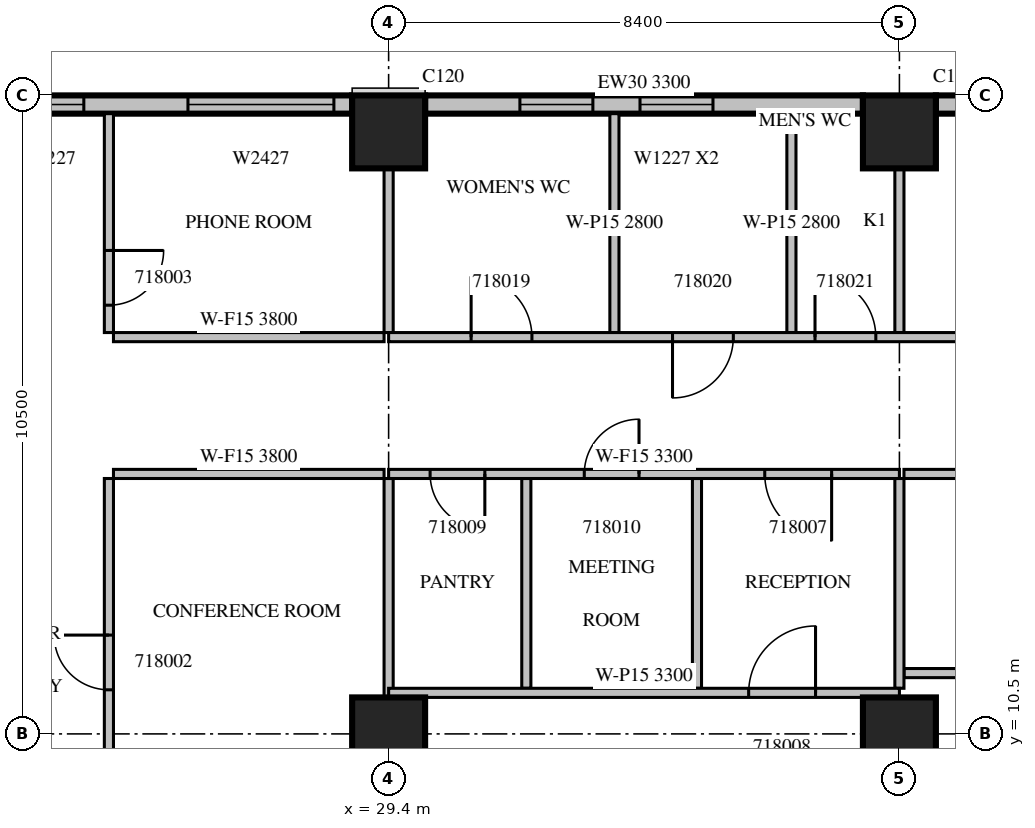
"""IFC4 building model, lengths in metres.
Left out: names, types, materials, properties, quantities, classifications, styles, units other than length and angle.
Written with IfcOpenShell. Run it as: python <this file> out.ifc"""

import sys

from ifc_helpers import new_model, si_unit, direction, frame, frame_2d, origin, origin_2d, place, context, subcontext, project, spatial, rectangle, extrude, source, transform, mapped, element, fill, save


model = new_model("IFC4")
c1 = context("Model", 3, precision=1e-05, world=origin(), true_north=direction((0.0, 1.0)))
c2 = subcontext(c1, "Body", "Model", "MODEL_VIEW")
j1 = project(units=[si_unit("LENGTHUNIT", "METRE"), si_unit("PLANEANGLEUNIT", "RADIAN")], contexts=[c1])
p1 = place(None, origin())
s1 = spatial("IfcSite", under=j1, at=p1, CompositionType="ELEMENT")
p2 = place(p1, origin())
s2 = spatial("IfcBuilding", under=s1, at=p2, CompositionType="ELEMENT")
p3 = place(p2, frame((0.0, 0.0, 86.7)))
s3 = spatial("IfcBuildingStorey", under=s2, at=p3, CompositionType="ELEMENT", Elevation=86.7)
m1 = source(origin(), c2, "Body", "SweptSolid", [
    extrude(rectangle(XDim=1.2, YDim=1.2, at=origin_2d()), origin(), (0.0, 0.0, 1.0), 4.2),
])
for number, where, z_axis, x_axis in (
    (1, (29.4, 10.5, 0.0), (0.0, 0.0, 1.0), (1.0, 0.0, 0.0)),
    (2, (37.8, 10.5, 0.0), (0.0, 0.0, 1.0), (1.0, 0.0, 0.0)),
    (3, (29.4, 20.4, 0.0), (0.0, 0.0, 1.0), (1.0, 0.0, 0.0)),
    (4, (37.8, 20.4, 0.0), (0.0, 0.0, 1.0), (1.0, 0.0, 0.0)),
):
    element("IfcColumn", number, at=place(p3, frame(where, z_axis=z_axis, x_axis=x_axis)), inside=s3, PredefinedType="COLUMN", context=c2, shape_type="MappedRepresentation", body=[
        mapped(m1, transform((0.0, 0.0, 0.0), scale=1.0)),
    ])
m2 = source(origin(), c2, "Body", "SweptSolid", [
    extrude(rectangle(XDim=7.2, YDim=0.3, at=frame_2d((3.6, 0.0))), origin(), (0.0, 0.0, 1.0), 3.8),
])
p4 = place(p3, frame((45.6, 20.85, 0.0), z_axis=(0.0, 0.0, 1.0), x_axis=(-1.0, 0.0, 0.0)))
e5 = element("IfcWall", 5, at=p4, inside=s3, PredefinedType="STANDARD", context=c2, shape_type="MappedRepresentation", body=[
    mapped(m2, transform((0.0, 0.0, 0.0), scale=1.0)),
])
m3 = source(origin(), c2, "Body", "SweptSolid", [
    extrude(rectangle(XDim=2.4, YDim=2.7, at=frame_2d((1.2, 1.35))), frame((0.0, 0.16, 0.0), z_axis=(0.0, -1.0, 0.0), x_axis=(1.0, 0.0, 0.0)), (0.0, 0.0, 1.0), 0.32),
])
p5 = place(p4, frame((0.3, 0.0, 0.6)))
e6 = element("IfcOpeningElement", 6, at=p5, cuts=e5, PredefinedType="OPENING", context=c2, shape_type="MappedRepresentation", body=[
    mapped(m3, transform((0.0, 0.0, 0.0), scale=1.0)),
])
p6 = place(p4, frame((3.75, 0.0, 0.6)))
e7 = element("IfcOpeningElement", 7, at=p6, cuts=e5, PredefinedType="OPENING", context=c2, shape_type="MappedRepresentation", body=[
    mapped(m3, transform((0.0, 0.0, 0.0), scale=1.0)),
])
m4 = source(origin(), c2, "Body", "SweptSolid", [
    extrude(rectangle(XDim=7.2, YDim=0.3, at=frame_2d((3.6, 0.0))), origin(), (0.0, 0.0, 1.0), 3.3),
])
p7 = place(p3, frame((37.2, 20.85, 0.0), z_axis=(0.0, 0.0, 1.0), x_axis=(-1.0, 0.0, 0.0)))
e8 = element("IfcWall", 8, at=p7, inside=s3, PredefinedType="STANDARD", context=c2, shape_type="MappedRepresentation", body=[
    mapped(m4, transform((0.0, 0.0, 0.0), scale=1.0)),
])
m5 = source(origin(), c2, "Body", "SweptSolid", [
    extrude(rectangle(XDim=1.2, YDim=2.7, at=frame_2d((0.6, 1.35))), frame((0.0, 0.16, 0.0), z_axis=(0.0, -1.0, 0.0), x_axis=(1.0, 0.0, 0.0)), (0.0, 0.0, 1.0), 0.32),
])
p8 = place(p7, frame((2.466, 0.0, 0.6)))
e9 = element("IfcOpeningElement", 9, at=p8, cuts=e8, PredefinedType="OPENING", context=c2, shape_type="MappedRepresentation", body=[
    mapped(m5, transform((0.0, 0.0, 0.0), scale=1.0)),
])
p9 = place(p7, frame((4.441, 0.0, 0.6)))
e10 = element("IfcOpeningElement", 10, at=p9, cuts=e8, PredefinedType="OPENING", context=c2, shape_type="MappedRepresentation", body=[
    mapped(m5, transform((0.0, 0.0, 0.0), scale=1.0)),
])
m6 = source(origin(), c2, "Body", "SweptSolid", [
    extrude(rectangle(XDim=6.6, YDim=0.3, at=frame_2d((3.3, 0.0))), origin(), (0.0, 0.0, 1.0), 3.8),
])
p10 = place(p3, frame((28.8, 20.85, 0.0), z_axis=(0.0, 0.0, 1.0), x_axis=(-1.0, 0.0, 0.0)))
e11 = element("IfcWall", 11, at=p10, inside=s3, PredefinedType="STANDARD", context=c2, shape_type="MappedRepresentation", body=[
    mapped(m6, transform((0.0, 0.0, 0.0), scale=1.0)),
])
p11 = place(p10, frame((0.3, 0.0, 0.6)))
e12 = element("IfcOpeningElement", 12, at=p11, cuts=e11, PredefinedType="OPENING", context=c2, shape_type="MappedRepresentation", body=[
    mapped(m3, transform((0.0, 0.0, 0.0), scale=1.0)),
])
p12 = place(p10, frame((4.412, 0.0, 0.6)))
e13 = element("IfcOpeningElement", 13, at=p12, cuts=e11, PredefinedType="OPENING", context=c2, shape_type="MappedRepresentation", body=[
    mapped(m5, transform((0.0, 0.0, 0.0), scale=1.0)),
])
m7 = source(origin(), c2, "Body", "SweptSolid", [
    extrude(rectangle(XDim=11.625, YDim=0.15, at=frame_2d((5.812, 0.0))), origin(), (0.0, 0.0, 1.0), 3.8),
])
p13 = place(p3, frame((24.8, 14.7, 0.0), z_axis=(0.0, 0.0, 1.0), x_axis=(0.0, -1.0, 0.0)))
e14 = element("IfcWall", 14, at=p13, inside=s3, PredefinedType="PARTITIONING", context=c2, shape_type="MappedRepresentation", body=[
    mapped(m7, transform((0.0, 0.0, 0.0), scale=1.0)),
])
m8 = source(origin(), c2, "Body", "SweptSolid", [
    extrude(rectangle(XDim=0.9, YDim=2.1, at=frame_2d((0.45, 1.05))), frame((0.0, 0.085, 0.0), z_axis=(0.0, -1.0, 0.0), x_axis=(1.0, 0.0, 0.0)), (0.0, 0.0, 1.0), 0.17),
])
p14 = place(p13, frame((9.262, 0.0, 0.0)))
e15 = element("IfcOpeningElement", 15, at=p14, cuts=e14, PredefinedType="OPENING", context=c2, shape_type="MappedRepresentation", body=[
    mapped(m8, transform((0.0, 0.0, 0.0), scale=1.0)),
])
p15 = place(p13, frame((2.575, 0.0, 0.0)))
e16 = element("IfcOpeningElement", 16, at=p15, cuts=e14, PredefinedType="OPENING", context=c2, shape_type="MappedRepresentation", body=[
    mapped(m8, transform((0.0, 0.0, 0.0), scale=1.0)),
])
m9 = source(origin(), c2, "Body", "SweptSolid", [
    extrude(rectangle(XDim=3.6, YDim=0.15, at=frame_2d((1.8, 0.0))), origin(), (0.0, 0.0, 1.0), 3.8),
])
p16 = place(p3, frame((24.8, 20.7, 0.0), z_axis=(0.0, 0.0, 1.0), x_axis=(0.0, -1.0, 0.0)))
e17 = element("IfcWall", 17, at=p16, inside=s3, PredefinedType="PARTITIONING", context=c2, shape_type="MappedRepresentation", body=[
    mapped(m9, transform((0.0, 0.0, 0.0), scale=1.0)),
])
p17 = place(p16, frame((2.25, 0.0, 0.0)))
e18 = element("IfcOpeningElement", 18, at=p17, cuts=e17, PredefinedType="OPENING", context=c2, shape_type="MappedRepresentation", body=[
    mapped(m8, transform((0.0, 0.0, 0.0), scale=1.0)),
])
m10 = source(origin(), c2, "Body", "SweptSolid", [
    extrude(rectangle(XDim=4.45, YDim=0.15, at=frame_2d((2.225, 0.0))), origin(), (0.0, 0.0, 1.0), 3.8),
])
for number, where, z_axis, x_axis in (
    (19, (29.325, 14.775, 0.0), (0.0, 0.0, 1.0), (-1.0, 0.0, 0.0)),
    (20, (24.875, 17.025, 0.0), (0.0, 0.0, 1.0), (1.0, 0.0, 0.0)),
):
    element("IfcWall", number, at=place(p3, frame(where, z_axis=z_axis, x_axis=x_axis)), inside=s3, PredefinedType="PARTITIONING", context=c2, shape_type="MappedRepresentation", body=[
        mapped(m10, transform((0.0, 0.0, 0.0), scale=1.0)),
    ])
m11 = source(origin(), c2, "Body", "SweptSolid", [
    extrude(rectangle(XDim=3.601, YDim=0.15, at=frame_2d((1.8, 0.0))), origin(), (0.0, 0.0, 1.0), 3.8),
])
p18 = place(p3, frame((29.4, 11.099, 0.0), z_axis=(0.0, 0.0, 1.0), x_axis=(0.0, 1.0, 0.0)))
e21 = element("IfcWall", 21, at=p18, inside=s3, PredefinedType="PARTITIONING", context=c2, shape_type="MappedRepresentation", body=[
    mapped(m11, transform((0.0, 0.0, 0.0), scale=1.0)),
])
m12 = source(origin(), c2, "Body", "SweptSolid", [
    extrude(rectangle(XDim=2.701, YDim=0.15, at=frame_2d((1.351, 0.0))), origin(), (0.0, 0.0, 1.0), 3.8),
])
p19 = place(p3, frame((29.4, 17.1, 0.0), z_axis=(0.0, 0.0, 1.0), x_axis=(0.0, 1.0, 0.0)))
e22 = element("IfcWall", 22, at=p19, inside=s3, PredefinedType="PARTITIONING", context=c2, shape_type="MappedRepresentation", body=[
    mapped(m12, transform((0.0, 0.0, 0.0), scale=1.0)),
])
m13 = source(origin(), c2, "Body", "SweptSolid", [
    extrude(rectangle(XDim=6.45, YDim=0.15, at=frame_2d((3.225, 0.0))), origin(), (0.0, 0.0, 1.0), 3.8),
])
p20 = place(p3, frame((37.875, 11.5, 0.0), z_axis=(0.0, 0.0, 1.0), x_axis=(1.0, 0.0, 0.0)))
e23 = element("IfcWall", 23, at=p20, inside=s3, PredefinedType="PARTITIONING", context=c2, shape_type="MappedRepresentation", body=[
    mapped(m13, transform((0.0, 0.0, 0.0), scale=1.0)),
])
p21 = place(p3, frame((44.325, 14.775, 0.0), z_axis=(0.0, 0.0, 1.0), x_axis=(-1.0, 0.0, 0.0)))
e24 = element("IfcWall", 24, at=p21, inside=s3, PredefinedType="PARTITIONING", context=c2, shape_type="MappedRepresentation", body=[
    mapped(m13, transform((0.0, 0.0, 0.0), scale=1.0)),
])
p22 = place(p21, frame((2.812, 0.0, 0.0)))
e25 = element("IfcOpeningElement", 25, at=p22, cuts=e24, PredefinedType="OPENING", context=c2, shape_type="MappedRepresentation", body=[
    mapped(m8, transform((0.0, 0.0, 0.0), scale=1.0)),
])
m14 = source(origin(), c2, "Body", "SweptSolid", [
    extrude(rectangle(XDim=3.45, YDim=0.15, at=frame_2d((1.725, 0.0))), origin(), (0.0, 0.0, 1.0), 3.8),
])
for number, where, z_axis, x_axis in (
    (26, (31.665, 11.25, 0.0), (0.0, 0.0, 1.0), (0.0, 1.0, 0.0)),
    (27, (34.471, 11.25, 0.0), (0.0, 0.0, 1.0), (0.0, 1.0, 0.0)),
    (28, (37.8, 11.25, 0.0), (0.0, 0.0, 1.0), (0.0, 1.0, 0.0)),
):
    element("IfcWall", number, at=place(p3, frame(where, z_axis=z_axis, x_axis=x_axis)), inside=s3, PredefinedType="PARTITIONING", context=c2, shape_type="MappedRepresentation", body=[
        mapped(m14, transform((0.0, 0.0, 0.0), scale=1.0)),
    ])
m15 = source(origin(), c2, "Body", "SweptSolid", [
    extrude(rectangle(XDim=8.4, YDim=0.15, at=frame_2d((4.2, 0.0))), origin(), (0.0, 0.0, 1.0), 3.3),
])
p23 = place(p3, frame((37.8, 11.175, 0.0), z_axis=(0.0, 0.0, 1.0), x_axis=(-1.0, 0.0, 0.0)))
e29 = element("IfcWall", 29, at=p23, inside=s3, PredefinedType="PARTITIONING", context=c2, shape_type="MappedRepresentation", body=[
    mapped(m15, transform((0.0, 0.0, 0.0), scale=1.0)),
])
m16 = source(origin(), c2, "Body", "SweptSolid", [
    extrude(rectangle(XDim=1.1, YDim=2.1, at=frame_2d((0.55, 1.05))), frame((0.0, 0.085, 0.0), z_axis=(0.0, -1.0, 0.0), x_axis=(1.0, 0.0, 0.0)), (0.0, 0.0, 1.0), 0.17),
])
p24 = place(p23, frame((1.379, 0.0, 0.0)))
e30 = element("IfcOpeningElement", 30, at=p24, cuts=e29, PredefinedType="OPENING", context=c2, shape_type="MappedRepresentation", body=[
    mapped(m16, transform((0.0, 0.0, 0.0), scale=1.0)),
])
m17 = source(origin(), c2, "Body", "SweptSolid", [
    extrude(rectangle(XDim=3.6, YDim=0.15, at=frame_2d((1.8, 0.0))), origin(), (0.0, 0.0, 1.0), 2.8),
])
for number, where, z_axis, x_axis in (
    (31, (33.113, 20.7, 0.0), (0.0, 0.0, 1.0), (0.0, -1.0, 0.0)),
    (32, (36.024, 20.7, 0.0), (0.0, 0.0, 1.0), (0.0, -1.0, 0.0)),
):
    element("IfcWall", number, at=place(p3, frame(where, z_axis=z_axis, x_axis=x_axis)), inside=s3, PredefinedType="PARTITIONING", context=c2, shape_type="MappedRepresentation", body=[
        mapped(m17, transform((0.0, 0.0, 0.0), scale=1.0)),
    ])
p25 = place(p3, frame((37.8, 17.1, 0.0), z_axis=(0.0, 0.0, 1.0), x_axis=(0.0, 1.0, 0.0)))
e33 = element("IfcWall", 33, at=p25, inside=s3, PredefinedType="PARTITIONING", context=c2, shape_type="MappedRepresentation", body=[
    mapped(m12, transform((0.0, 0.0, 0.0), scale=1.0)),
])
p26 = place(p3, frame((37.8, 14.775, 0.0), z_axis=(0.0, 0.0, 1.0), x_axis=(-1.0, 0.0, 0.0)))
e34 = element("IfcWall", 34, at=p26, inside=s3, PredefinedType="PARTITIONING", context=c2, shape_type="MappedRepresentation", body=[
    mapped(m15, transform((0.0, 0.0, 0.0), scale=1.0)),
])
p27 = place(p26, frame((1.115, 0.0, 0.0)))
e35 = element("IfcOpeningElement", 35, at=p27, cuts=e34, PredefinedType="OPENING", context=c2, shape_type="MappedRepresentation", body=[
    mapped(m16, transform((0.0, 0.0, 0.0), scale=1.0)),
])
p28 = place(p26, frame((6.818, 0.0, 0.0)))
e36 = element("IfcOpeningElement", 36, at=p28, cuts=e34, PredefinedType="OPENING", context=c2, shape_type="MappedRepresentation", body=[
    mapped(m8, transform((0.0, 0.0, 0.0), scale=1.0)),
])
p29 = place(p26, frame((4.282, 0.0, 0.0)))
e37 = element("IfcOpeningElement", 37, at=p29, cuts=e34, PredefinedType="OPENING", context=c2, shape_type="MappedRepresentation", body=[
    mapped(m8, transform((0.0, 0.0, 0.0), scale=1.0)),
])
m18 = source(origin(), c2, "Body", "SweptSolid", [
    extrude(rectangle(XDim=37.5, YDim=0.15, at=frame_2d((18.75, 0.0))), origin(), (0.0, 0.0, 1.0), 3.3),
])
p30 = place(p3, frame((29.4, 17.025, 0.0), z_axis=(0.0, 0.0, 1.0), x_axis=(1.0, 0.0, 0.0)))
e38 = element("IfcWall", 38, at=p30, inside=s3, PredefinedType="PARTITIONING", context=c2, shape_type="MappedRepresentation", body=[
    mapped(m18, transform((0.0, 0.0, 0.0), scale=1.0)),
])
m19 = source(origin(), c2, "Body", "SweptSolid", [
    extrude(rectangle(XDim=1.0, YDim=2.1, at=frame_2d((0.5, 1.05))), frame((0.0, 0.085, 0.0), z_axis=(0.0, -1.0, 0.0), x_axis=(1.0, 0.0, 0.0)), (0.0, 0.0, 1.0), 0.17),
])
p31 = place(p30, frame((1.357, 0.0, 0.0)))
e39 = element("IfcOpeningElement", 39, at=p31, cuts=e38, PredefinedType="OPENING", context=c2, shape_type="MappedRepresentation", body=[
    mapped(m19, transform((0.0, 0.0, 0.0), scale=1.0)),
])
p32 = place(p30, frame((4.669, 0.0, 0.0)))
e40 = element("IfcOpeningElement", 40, at=p32, cuts=e38, PredefinedType="OPENING", context=c2, shape_type="MappedRepresentation", body=[
    mapped(m19, transform((0.0, 0.0, 0.0), scale=1.0)),
])
p33 = place(p30, frame((7.012, 0.0, 0.0)))
e41 = element("IfcOpeningElement", 41, at=p33, cuts=e38, PredefinedType="OPENING", context=c2, shape_type="MappedRepresentation", body=[
    mapped(m19, transform((0.0, 0.0, 0.0), scale=1.0)),
])
p34 = place(p30, frame((12.1, 0.0, 0.0)))
e42 = element("IfcOpeningElement", 42, at=p34, cuts=e38, PredefinedType="OPENING", context=c2, shape_type="MappedRepresentation", body=[
    mapped(m19, transform((0.0, 0.0, 0.0), scale=1.0)),
])
p35 = place(p30, frame((18.898, 0.0, 0.0)))
e43 = element("IfcOpeningElement", 43, at=p35, cuts=e38, PredefinedType="OPENING", context=c2, shape_type="MappedRepresentation", body=[
    mapped(m19, transform((0.0, 0.0, 0.0), scale=1.0)),
])
p36 = place(p30, frame((23.543, 0.0, 0.0)))
e44 = element("IfcOpeningElement", 44, at=p36, cuts=e38, PredefinedType="OPENING", context=c2, shape_type="MappedRepresentation", body=[
    mapped(m19, transform((0.0, 0.0, 0.0), scale=1.0)),
])
p37 = place(p30, frame((26.826, 0.0, 0.0)))
e45 = element("IfcOpeningElement", 45, at=p37, cuts=e38, PredefinedType="OPENING", context=c2, shape_type="MappedRepresentation", body=[
    mapped(m19, transform((0.0, 0.0, 0.0), scale=1.0)),
])
m20 = source(origin(), c2, "Body", "SweptSolid", [
    extrude(rectangle(XDim=1.2, YDim=2.1, at=frame_2d((0.6, 1.05))), frame((0.0, 0.085, 0.0), z_axis=(0.0, -1.0, 0.0), x_axis=(1.0, 0.0, 0.0)), (0.0, 0.0, 1.0), 0.17),
])
p38 = place(p30, frame((30.214, 0.0, 0.0)))
e46 = element("IfcOpeningElement", 46, at=p38, cuts=e38, PredefinedType="OPENING", context=c2, shape_type="MappedRepresentation", body=[
    mapped(m20, transform((0.0, 0.0, 0.0), scale=1.0)),
])
p39 = place(p30, frame((34.721, 0.0, 0.0)))
e47 = element("IfcOpeningElement", 47, at=p39, cuts=e38, PredefinedType="OPENING", context=c2, shape_type="MappedRepresentation", body=[
    mapped(m20, transform((0.0, 0.0, 0.0), scale=1.0)),
])
m21 = source(origin(), c2, "Body", "SweptSolid", [
    extrude(rectangle(XDim=1.2, YDim=2.7, at=frame_2d((0.6, 1.35))), frame((0.0, 0.03, 0.0), z_axis=(0.0, -1.0, 0.0), x_axis=(1.0, 0.0, 0.0)), (0.0, 0.0, 1.0), 0.06),
])
p40 = place(p8, origin())
e48 = element("IfcWindow", 48, at=p40, inside=s3, PartitioningType="SINGLE_PANEL", PredefinedType="WINDOW", context=c2, shape_type="MappedRepresentation", body=[
    mapped(m21, transform((0.0, 0.0, 0.0), scale=1.0)),
])
fill(e9, e48)
p41 = place(p9, origin())
e49 = element("IfcWindow", 49, at=p41, inside=s3, PartitioningType="SINGLE_PANEL", PredefinedType="WINDOW", context=c2, shape_type="MappedRepresentation", body=[
    mapped(m21, transform((0.0, 0.0, 0.0), scale=1.0)),
])
fill(e10, e49)
m22 = source(origin(), c2, "Body", "SweptSolid", [
    extrude(rectangle(XDim=2.4, YDim=2.7, at=frame_2d((1.2, 1.35))), frame((0.0, 0.03, 0.0), z_axis=(0.0, -1.0, 0.0), x_axis=(1.0, 0.0, 0.0)), (0.0, 0.0, 1.0), 0.06),
])
p42 = place(p11, origin())
e50 = element("IfcWindow", 50, at=p42, inside=s3, PartitioningType="SINGLE_PANEL", PredefinedType="WINDOW", context=c2, shape_type="MappedRepresentation", body=[
    mapped(m22, transform((0.0, 0.0, 0.0), scale=1.0)),
])
fill(e12, e50)
p43 = place(p12, origin())
e51 = element("IfcWindow", 51, at=p43, inside=s3, PartitioningType="SINGLE_PANEL", PredefinedType="WINDOW", context=c2, shape_type="MappedRepresentation", body=[
    mapped(m21, transform((0.0, 0.0, 0.0), scale=1.0)),
])
fill(e13, e51)
m23 = source(origin(), c2, "Body", "SweptSolid", [
    extrude(rectangle(XDim=0.9, YDim=2.1, at=frame_2d((0.45, 1.05))), frame((0.0, 0.025, 0.0), z_axis=(0.0, -1.0, 0.0), x_axis=(1.0, 0.0, 0.0)), (0.0, 0.0, 1.0), 0.05),
])
p44 = place(p15, origin())
e52 = element("IfcDoor", 52, at=p44, inside=s3, OperationType="SINGLE_SWING_RIGHT", PredefinedType="DOOR", context=c2, shape_type="MappedRepresentation", body=[
    mapped(m23, transform((0.0, 0.0, 0.0), scale=1.0)),
])
fill(e16, e52)
p45 = place(p17, origin())
e53 = element("IfcDoor", 53, at=p45, inside=s3, OperationType="SINGLE_SWING_LEFT", PredefinedType="DOOR", context=c2, shape_type="MappedRepresentation", body=[
    mapped(m23, transform((0.0, 0.0, 0.0), scale=1.0)),
])
fill(e18, e53)
m24 = source(origin(), c2, "Body", "SweptSolid", [
    extrude(rectangle(XDim=1.1, YDim=2.1, at=frame_2d((0.55, 1.05))), frame((0.0, 0.025, 0.0), z_axis=(0.0, -1.0, 0.0), x_axis=(1.0, 0.0, 0.0)), (0.0, 0.0, 1.0), 0.05),
])
p46 = place(p27, origin())
e54 = element("IfcDoor", 54, at=p46, inside=s3, OperationType="SINGLE_SWING_LEFT", PredefinedType="DOOR", context=c2, shape_type="MappedRepresentation", body=[
    mapped(m24, transform((0.0, 0.0, 0.0), scale=1.0)),
])
fill(e35, e54)
p47 = place(p24, origin())
e55 = element("IfcDoor", 55, at=p47, inside=s3, OperationType="SINGLE_SWING_RIGHT", PredefinedType="DOOR", context=c2, shape_type="MappedRepresentation", body=[
    mapped(m24, transform((0.0, 0.0, 0.0), scale=1.0)),
])
fill(e30, e55)
p48 = place(p28, origin())
e56 = element("IfcDoor", 56, at=p48, inside=s3, OperationType="SINGLE_SWING_LEFT", PredefinedType="DOOR", context=c2, shape_type="MappedRepresentation", body=[
    mapped(m23, transform((0.0, 0.0, 0.0), scale=1.0)),
])
fill(e36, e56)
p49 = place(p29, origin())
e57 = element("IfcDoor", 57, at=p49, inside=s3, OperationType="SINGLE_SWING_RIGHT", PredefinedType="DOOR", context=c2, shape_type="MappedRepresentation", body=[
    mapped(m23, transform((0.0, 0.0, 0.0), scale=1.0)),
])
fill(e37, e57)
m25 = source(origin(), c2, "Body", "SweptSolid", [
    extrude(rectangle(XDim=1.0, YDim=2.1, at=frame_2d((0.5, 1.05))), frame((0.0, 0.025, 0.0), z_axis=(0.0, -1.0, 0.0), x_axis=(1.0, 0.0, 0.0)), (0.0, 0.0, 1.0), 0.05),
])
p50 = place(p31, origin())
e58 = element("IfcDoor", 58, at=p50, inside=s3, OperationType="SINGLE_SWING_LEFT", PredefinedType="DOOR", context=c2, shape_type="MappedRepresentation", body=[
    mapped(m25, transform((0.0, 0.0, 0.0), scale=1.0)),
])
fill(e39, e58)
p51 = place(p32, origin())
e59 = element("IfcDoor", 59, at=p51, inside=s3, OperationType="SINGLE_SWING_RIGHT", PredefinedType="DOOR", context=c2, shape_type="MappedRepresentation", body=[
    mapped(m25, transform((0.0, 0.0, 0.0), scale=1.0)),
])
fill(e40, e59)
p52 = place(p33, origin())
e60 = element("IfcDoor", 60, at=p52, inside=s3, OperationType="SINGLE_SWING_LEFT", PredefinedType="DOOR", context=c2, shape_type="MappedRepresentation", body=[
    mapped(m25, transform((0.0, 0.0, 0.0), scale=1.0)),
])
fill(e41, e60)
save(model, sys.argv[1])
